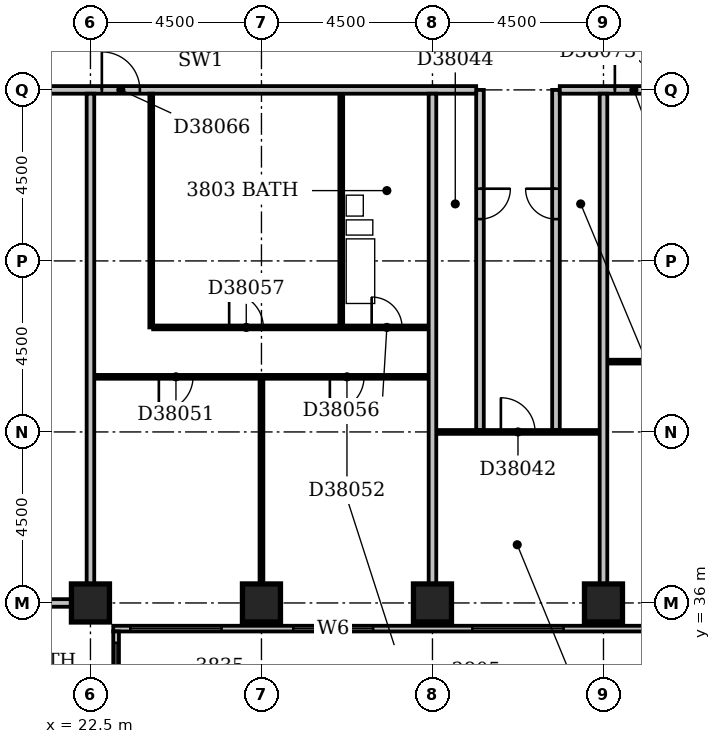
"""IFC4 building model, lengths in metres.
Left out: names, types, materials, properties, quantities, classifications, styles, units other than length and angle.
Written with IfcOpenShell. Run it as: python <this file> out.ifc"""

import sys

from ifc_helpers import new_model, si_unit, direction, frame, frame_2d, origin, origin_2d, place, context, subcontext, project, spatial, rectangle, extrude, element, fill, save


model = new_model("IFC4")
c1 = context("Model", 3, precision=1e-05, world=origin(), true_north=direction((0.0, 1.0)))
c2 = subcontext(c1, "Body", "Model", "MODEL_VIEW")
j1 = project(units=[si_unit("LENGTHUNIT", "METRE"), si_unit("PLANEANGLEUNIT", "RADIAN")], contexts=[c1])
p1 = place(None, origin())
s1 = spatial("IfcSite", under=j1, at=p1, CompositionType="ELEMENT")
p2 = place(p1, origin())
s2 = spatial("IfcBuilding", under=s1, at=p2, CompositionType="ELEMENT")
p3 = place(p2, frame((0.0, 0.0, 152.0)))
s3 = spatial("IfcBuildingStorey", under=s2, at=p3, CompositionType="ELEMENT", Elevation=152.0)
for number, where, z_axis, x_axis in (
    (1, (22.5, 36.0, -0.3), (0.0, 0.0, 1.0), (1.0, 0.0, 0.0)),
    (2, (27.0, 36.0, -0.3), (0.0, 0.0, 1.0), (1.0, 0.0, 0.0)),
    (3, (31.5, 36.0, -0.3), (0.0, 0.0, 1.0), (1.0, 0.0, 0.0)),
    (4, (36.0, 36.0, -0.3), (0.0, 0.0, 1.0), (1.0, 0.0, 0.0)),
):
    element("IfcColumn", number, at=place(p3, frame(where, z_axis=z_axis, x_axis=x_axis)), inside=s3, PredefinedType="COLUMN", context=c2, shape_type="SweptSolid", body=[
        extrude(rectangle(XDim=1.0, YDim=1.0, at=origin_2d()), origin(), (0.0, 0.0, 1.0), 3.6),
    ])
p4 = place(p3, frame((23.175, 17.4, 0.0), z_axis=(0.0, 0.0, 1.0), x_axis=(0.0, 1.0, 0.0)))
e5 = element("IfcWall", 5, at=p4, inside=s3, PredefinedType="STANDARD", context=c2, shape_type="SweptSolid", body=[
    extrude(rectangle(XDim=17.85, YDim=0.15, at=frame_2d((8.925, 0.0))), origin(), (0.0, 0.0, 1.0), 2.7),
])
p5 = place(p4, frame((1.65, 0.0, 0.6)))
e6 = element("IfcOpeningElement", 6, at=p5, cuts=e5, PredefinedType="OPENING", context=c2, shape_type="SweptSolid", body=[
    extrude(rectangle(XDim=2.4, YDim=1.8, at=frame_2d((1.2, 0.9))), frame((0.0, 0.087, 0.0), z_axis=(0.0, -1.0, 0.0), x_axis=(1.0, 0.0, 0.0)), (0.0, 0.0, 1.0), 0.174),
])
p6 = place(p4, frame((6.15, 0.0, 0.6)))
e7 = element("IfcOpeningElement", 7, at=p6, cuts=e5, PredefinedType="OPENING", context=c2, shape_type="SweptSolid", body=[
    extrude(rectangle(XDim=2.4, YDim=1.8, at=frame_2d((1.2, 0.9))), frame((0.0, 0.087, 0.0), z_axis=(0.0, -1.0, 0.0), x_axis=(1.0, 0.0, 0.0)), (0.0, 0.0, 1.0), 0.174),
])
p7 = place(p4, frame((11.844, 0.0, 0.6)))
e8 = element("IfcOpeningElement", 8, at=p7, cuts=e5, PredefinedType="OPENING", context=c2, shape_type="SweptSolid", body=[
    extrude(rectangle(XDim=1.5, YDim=1.8, at=frame_2d((0.75, 0.9))), frame((0.0, 0.087, 0.0), z_axis=(0.0, -1.0, 0.0), x_axis=(1.0, 0.0, 0.0)), (0.0, 0.0, 1.0), 0.174),
])
p8 = place(p4, frame((15.15, 0.0, 0.6)))
e9 = element("IfcOpeningElement", 9, at=p8, cuts=e5, PredefinedType="OPENING", context=c2, shape_type="SweptSolid", body=[
    extrude(rectangle(XDim=2.4, YDim=1.8, at=frame_2d((1.2, 0.9))), frame((0.0, 0.087, 0.0), z_axis=(0.0, -1.0, 0.0), x_axis=(1.0, 0.0, 0.0)), (0.0, 0.0, 1.0), 0.174),
])
p9 = place(p3, frame((23.1, 35.325, 0.0), z_axis=(0.0, 0.0, 1.0), x_axis=(1.0, 0.0, 0.0)))
e10 = element("IfcWall", 10, at=p9, inside=s3, PredefinedType="STANDARD", context=c2, shape_type="SweptSolid", body=[
    extrude(rectangle(XDim=45.15, YDim=0.15, at=frame_2d((22.575, 0.0))), origin(), (0.0, 0.0, 1.0), 2.7),
])
p10 = place(p9, frame((0.45, 0.0, 0.6)))
e11 = element("IfcOpeningElement", 11, at=p10, cuts=e10, PredefinedType="OPENING", context=c2, shape_type="SweptSolid", body=[
    extrude(rectangle(XDim=2.4, YDim=1.8, at=frame_2d((1.2, 0.9))), frame((0.0, 0.087, 0.0), z_axis=(0.0, -1.0, 0.0), x_axis=(1.0, 0.0, 0.0)), (0.0, 0.0, 1.0), 0.174),
])
p11 = place(p9, frame((4.738, 0.0, 0.6)))
e12 = element("IfcOpeningElement", 12, at=p11, cuts=e10, PredefinedType="OPENING", context=c2, shape_type="SweptSolid", body=[
    extrude(rectangle(XDim=2.1, YDim=1.8, at=frame_2d((1.05, 0.9))), frame((0.0, 0.087, 0.0), z_axis=(0.0, -1.0, 0.0), x_axis=(1.0, 0.0, 0.0)), (0.0, 0.0, 1.0), 0.174),
])
p12 = place(p9, frame((9.45, 0.0, 0.6)))
e13 = element("IfcOpeningElement", 13, at=p12, cuts=e10, PredefinedType="OPENING", context=c2, shape_type="SweptSolid", body=[
    extrude(rectangle(XDim=2.4, YDim=1.8, at=frame_2d((1.2, 0.9))), frame((0.0, 0.087, 0.0), z_axis=(0.0, -1.0, 0.0), x_axis=(1.0, 0.0, 0.0)), (0.0, 0.0, 1.0), 0.174),
])
p13 = place(p9, frame((13.95, 0.0, 0.6)))
e14 = element("IfcOpeningElement", 14, at=p13, cuts=e10, PredefinedType="OPENING", context=c2, shape_type="SweptSolid", body=[
    extrude(rectangle(XDim=2.4, YDim=1.8, at=frame_2d((1.2, 0.9))), frame((0.0, 0.087, 0.0), z_axis=(0.0, -1.0, 0.0), x_axis=(1.0, 0.0, 0.0)), (0.0, 0.0, 1.0), 0.174),
])
p14 = place(p9, frame((19.34, 0.0, 0.6)))
e15 = element("IfcOpeningElement", 15, at=p14, cuts=e10, PredefinedType="OPENING", context=c2, shape_type="SweptSolid", body=[
    extrude(rectangle(XDim=1.8, YDim=1.8, at=frame_2d((0.9, 0.9))), frame((0.0, 0.087, 0.0), z_axis=(0.0, -1.0, 0.0), x_axis=(1.0, 0.0, 0.0)), (0.0, 0.0, 1.0), 0.174),
])
p15 = place(p9, frame((22.95, 0.0, 0.6)))
e16 = element("IfcOpeningElement", 16, at=p15, cuts=e10, PredefinedType="OPENING", context=c2, shape_type="SweptSolid", body=[
    extrude(rectangle(XDim=2.4, YDim=1.8, at=frame_2d((1.2, 0.9))), frame((0.0, 0.087, 0.0), z_axis=(0.0, -1.0, 0.0), x_axis=(1.0, 0.0, 0.0)), (0.0, 0.0, 1.0), 0.174),
])
p16 = place(p9, frame((27.45, 0.0, 0.6)))
e17 = element("IfcOpeningElement", 17, at=p16, cuts=e10, PredefinedType="OPENING", context=c2, shape_type="SweptSolid", body=[
    extrude(rectangle(XDim=2.4, YDim=1.8, at=frame_2d((1.2, 0.9))), frame((0.0, 0.087, 0.0), z_axis=(0.0, -1.0, 0.0), x_axis=(1.0, 0.0, 0.0)), (0.0, 0.0, 1.0), 0.174),
])
p17 = place(p9, frame((31.95, 0.0, 0.6)))
e18 = element("IfcOpeningElement", 18, at=p17, cuts=e10, PredefinedType="OPENING", context=c2, shape_type="SweptSolid", body=[
    extrude(rectangle(XDim=2.4, YDim=1.8, at=frame_2d((1.2, 0.9))), frame((0.0, 0.087, 0.0), z_axis=(0.0, -1.0, 0.0), x_axis=(1.0, 0.0, 0.0)), (0.0, 0.0, 1.0), 0.174),
])
p18 = place(p9, frame((38.27, 0.0, 0.6)))
e19 = element("IfcOpeningElement", 19, at=p18, cuts=e10, PredefinedType="OPENING", context=c2, shape_type="SweptSolid", body=[
    extrude(rectangle(XDim=0.9, YDim=1.8, at=frame_2d((0.45, 0.9))), frame((0.0, 0.087, 0.0), z_axis=(0.0, -1.0, 0.0), x_axis=(1.0, 0.0, 0.0)), (0.0, 0.0, 1.0), 0.174),
])
p19 = place(p9, frame((40.95, 0.0, 0.6)))
e20 = element("IfcOpeningElement", 20, at=p19, cuts=e10, PredefinedType="OPENING", context=c2, shape_type="SweptSolid", body=[
    extrude(rectangle(XDim=2.4, YDim=1.8, at=frame_2d((1.2, 0.9))), frame((0.0, 0.087, 0.0), z_axis=(0.0, -1.0, 0.0), x_axis=(1.0, 0.0, 0.0)), (0.0, 0.0, 1.0), 0.174),
])
for number, where, z_axis, x_axis in (
    (21, (9.1, 36.0, 0.0), (0.0, 0.0, 1.0), (1.0, 0.0, 0.0)),
    (22, (22.5, 36.5, 0.0), (0.0, 0.0, 1.0), (0.0, 1.0, 0.0)),
):
    element("IfcWall", number, at=place(p3, frame(where, z_axis=z_axis, x_axis=x_axis)), inside=s3, PredefinedType="PARTITIONING", context=c2, shape_type="SweptSolid", body=[
        extrude(rectangle(XDim=12.9, YDim=0.2, at=frame_2d((6.45, 0.0))), origin(), (0.0, 0.0, 1.0), 3.3),
    ])
p20 = place(p3, frame((27.0, 36.5, 0.0), z_axis=(0.0, 0.0, 1.0), x_axis=(0.0, 1.0, 0.0)))
e23 = element("IfcWall", 23, at=p20, inside=s3, PredefinedType="PARTITIONING", context=c2, shape_type="SweptSolid", body=[
    extrude(rectangle(XDim=5.4, YDim=0.1, at=frame_2d((2.7, 0.0))), origin(), (0.0, 0.0, 1.0), 2.6),
])
p21 = place(p3, frame((31.5, 36.5, 0.0), z_axis=(0.0, 0.0, 1.0), x_axis=(0.0, 1.0, 0.0)))
e24 = element("IfcWall", 24, at=p21, inside=s3, PredefinedType="PARTITIONING", context=c2, shape_type="SweptSolid", body=[
    extrude(rectangle(XDim=12.9, YDim=0.2, at=frame_2d((6.45, 0.0))), origin(), (0.0, 0.0, 1.0), 3.3),
])
p22 = place(p3, frame((36.0, 36.5, 0.0), z_axis=(0.0, 0.0, 1.0), x_axis=(0.0, 1.0, 0.0)))
e25 = element("IfcWall", 25, at=p22, inside=s3, PredefinedType="PARTITIONING", context=c2, shape_type="SweptSolid", body=[
    extrude(rectangle(XDim=12.9, YDim=0.2, at=frame_2d((6.45, 0.0))), origin(), (0.0, 0.0, 1.0), 2.4),
])
p23 = place(p3, frame((31.6, 40.5, 0.0), z_axis=(0.0, 0.0, 1.0), x_axis=(1.0, 0.0, 0.0)))
e26 = element("IfcWall", 26, at=p23, inside=s3, PredefinedType="PARTITIONING", context=c2, shape_type="SweptSolid", body=[
    extrude(rectangle(XDim=4.3, YDim=0.1, at=frame_2d((2.15, 0.0))), origin(), (0.0, 0.0, 1.0), 3.3),
])
p24 = place(p23, frame((1.7, 0.0, 0.0)))
e27 = element("IfcOpeningElement", 27, at=p24, cuts=e26, PredefinedType="OPENING", context=c2, shape_type="SweptSolid", body=[
    extrude(rectangle(XDim=0.9, YDim=2.1, at=frame_2d((0.45, 1.05))), frame((0.0, 0.062, 0.0), z_axis=(0.0, -1.0, 0.0), x_axis=(1.0, 0.0, 0.0)), (0.0, 0.0, 1.0), 0.124),
])
p25 = place(p3, frame((32.75, 40.55, 0.0), z_axis=(0.0, 0.0, 1.0), x_axis=(0.0, 1.0, 0.0)))
e28 = element("IfcWall", 28, at=p25, inside=s3, PredefinedType="PARTITIONING", context=c2, shape_type="SweptSolid", body=[
    extrude(rectangle(XDim=8.95, YDim=0.2, at=frame_2d((4.475, 0.0))), origin(), (0.0, 0.0, 1.0), 3.3),
])
p26 = place(p25, frame((5.55, 0.0, 0.0)))
e29 = element("IfcOpeningElement", 29, at=p26, cuts=e28, PredefinedType="OPENING", context=c2, shape_type="SweptSolid", body=[
    extrude(rectangle(XDim=0.8, YDim=2.1, at=frame_2d((0.4, 1.05))), frame((0.0, 0.112, 0.0), z_axis=(0.0, -1.0, 0.0), x_axis=(1.0, 0.0, 0.0)), (0.0, 0.0, 1.0), 0.224),
])
p27 = place(p3, frame((34.75, 40.55, 0.0), z_axis=(0.0, 0.0, 1.0), x_axis=(0.0, 1.0, 0.0)))
e30 = element("IfcWall", 30, at=p27, inside=s3, PredefinedType="PARTITIONING", context=c2, shape_type="SweptSolid", body=[
    extrude(rectangle(XDim=8.95, YDim=0.2, at=frame_2d((4.475, 0.0))), origin(), (0.0, 0.0, 1.0), 3.3),
])
p28 = place(p27, frame((5.55, 0.0, 0.0)))
e31 = element("IfcOpeningElement", 31, at=p28, cuts=e30, PredefinedType="OPENING", context=c2, shape_type="SweptSolid", body=[
    extrude(rectangle(XDim=0.8, YDim=2.1, at=frame_2d((0.4, 1.05))), frame((0.0, 0.112, 0.0), z_axis=(0.0, -1.0, 0.0), x_axis=(1.0, 0.0, 0.0)), (0.0, 0.0, 1.0), 0.224),
])
p29 = place(p3, frame((22.6, 41.95, 0.0), z_axis=(0.0, 0.0, 1.0), x_axis=(1.0, 0.0, 0.0)))
e32 = element("IfcWall", 32, at=p29, inside=s3, PredefinedType="PARTITIONING", context=c2, shape_type="SweptSolid", body=[
    extrude(rectangle(XDim=8.8, YDim=0.1, at=frame_2d((4.4, 0.0))), origin(), (0.0, 0.0, 1.0), 3.3),
])
p30 = place(p29, frame((1.7, 0.0, 0.0)))
e33 = element("IfcOpeningElement", 33, at=p30, cuts=e32, PredefinedType="OPENING", context=c2, shape_type="SweptSolid", body=[
    extrude(rectangle(XDim=0.9, YDim=2.1, at=frame_2d((0.45, 1.05))), frame((0.0, 0.062, 0.0), z_axis=(0.0, -1.0, 0.0), x_axis=(1.0, 0.0, 0.0)), (0.0, 0.0, 1.0), 0.124),
])
p31 = place(p29, frame((6.2, 0.0, 0.0)))
e34 = element("IfcOpeningElement", 34, at=p31, cuts=e32, PredefinedType="OPENING", context=c2, shape_type="SweptSolid", body=[
    extrude(rectangle(XDim=0.9, YDim=2.1, at=frame_2d((0.45, 1.05))), frame((0.0, 0.062, 0.0), z_axis=(0.0, -1.0, 0.0), x_axis=(1.0, 0.0, 0.0)), (0.0, 0.0, 1.0), 0.124),
])
p32 = place(p3, frame((36.1, 42.35, 0.0), z_axis=(0.0, 0.0, 1.0), x_axis=(1.0, 0.0, 0.0)))
e35 = element("IfcWall", 35, at=p32, inside=s3, PredefinedType="PARTITIONING", context=c2, shape_type="SweptSolid", body=[
    extrude(rectangle(XDim=13.3, YDim=0.1, at=frame_2d((6.65, 0.0))), origin(), (0.0, 0.0, 1.0), 3.3),
])
p33 = place(p32, frame((1.7, 0.0, 0.0)))
e36 = element("IfcOpeningElement", 36, at=p33, cuts=e35, PredefinedType="OPENING", context=c2, shape_type="SweptSolid", body=[
    extrude(rectangle(XDim=0.9, YDim=2.1, at=frame_2d((0.45, 1.05))), frame((0.0, 0.062, 0.0), z_axis=(0.0, -1.0, 0.0), x_axis=(1.0, 0.0, 0.0)), (0.0, 0.0, 1.0), 0.124),
])
p34 = place(p32, frame((6.2, 0.0, 0.0)))
e37 = element("IfcOpeningElement", 37, at=p34, cuts=e35, PredefinedType="OPENING", context=c2, shape_type="SweptSolid", body=[
    extrude(rectangle(XDim=0.9, YDim=2.1, at=frame_2d((0.45, 1.05))), frame((0.0, 0.062, 0.0), z_axis=(0.0, -1.0, 0.0), x_axis=(1.0, 0.0, 0.0)), (0.0, 0.0, 1.0), 0.124),
])
p35 = place(p32, frame((10.7, 0.0, 0.0)))
e38 = element("IfcOpeningElement", 38, at=p35, cuts=e35, PredefinedType="OPENING", context=c2, shape_type="SweptSolid", body=[
    extrude(rectangle(XDim=0.9, YDim=2.1, at=frame_2d((0.45, 1.05))), frame((0.0, 0.062, 0.0), z_axis=(0.0, -1.0, 0.0), x_axis=(1.0, 0.0, 0.0)), (0.0, 0.0, 1.0), 0.124),
])
p36 = place(p3, frame((24.1, 43.25, 0.0), z_axis=(0.0, 0.0, 1.0), x_axis=(0.0, 1.0, 0.0)))
e39 = element("IfcWall", 39, at=p36, inside=s3, PredefinedType="PARTITIONING", context=c2, shape_type="SweptSolid", body=[
    extrude(rectangle(XDim=6.15, YDim=0.1, at=frame_2d((3.075, 0.0))), origin(), (0.0, 0.0, 1.0), 3.3),
])
p37 = place(p3, frame((24.15, 43.25, 0.0), z_axis=(0.0, 0.0, 1.0), x_axis=(1.0, 0.0, 0.0)))
e40 = element("IfcWall", 40, at=p37, inside=s3, PredefinedType="PARTITIONING", context=c2, shape_type="SweptSolid", body=[
    extrude(rectangle(XDim=7.25, YDim=0.1, at=frame_2d((3.625, 0.0))), origin(), (0.0, 0.0, 1.0), 3.3),
])
p38 = place(p37, frame((5.75, 0.0, 0.0)))
e41 = element("IfcOpeningElement", 41, at=p38, cuts=e40, PredefinedType="OPENING", context=c2, shape_type="SweptSolid", body=[
    extrude(rectangle(XDim=0.8, YDim=2.1, at=frame_2d((0.4, 1.05))), frame((0.0, 0.062, 0.0), z_axis=(0.0, -1.0, 0.0), x_axis=(1.0, 0.0, 0.0)), (0.0, 0.0, 1.0), 0.124),
])
p39 = place(p37, frame((2.0, 0.0, 0.0)))
e42 = element("IfcOpeningElement", 42, at=p39, cuts=e40, PredefinedType="OPENING", context=c2, shape_type="SweptSolid", body=[
    extrude(rectangle(XDim=0.9, YDim=2.1, at=frame_2d((0.45, 1.05))), frame((0.0, 0.062, 0.0), z_axis=(0.0, -1.0, 0.0), x_axis=(1.0, 0.0, 0.0)), (0.0, 0.0, 1.0), 0.124),
])
p40 = place(p3, frame((29.1, 43.3, 0.0), z_axis=(0.0, 0.0, 1.0), x_axis=(0.0, 1.0, 0.0)))
e43 = element("IfcWall", 43, at=p40, inside=s3, PredefinedType="PLUMBINGWALL", context=c2, shape_type="SweptSolid", body=[
    extrude(rectangle(XDim=6.1, YDim=0.1, at=frame_2d((3.05, 0.0))), origin(), (0.0, 0.0, 1.0), 3.3),
])
p41 = place(p3, frame((9.1, 49.5, 0.0), z_axis=(0.0, 0.0, 1.0), x_axis=(1.0, 0.0, 0.0)))
e44 = element("IfcWall", 44, at=p41, inside=s3, PredefinedType="PARTITIONING", context=c2, shape_type="SweptSolid", body=[
    extrude(rectangle(XDim=23.55, YDim=0.2, at=frame_2d((11.775, 0.0))), origin(), (0.0, 0.0, 1.0), 3.3),
])
p42 = place(p41, frame((13.7, 0.0, 0.0)))
e45 = element("IfcOpeningElement", 45, at=p42, cuts=e44, PredefinedType="OPENING", context=c2, shape_type="SweptSolid", body=[
    extrude(rectangle(XDim=1.0, YDim=2.1, at=frame_2d((0.5, 1.05))), frame((0.0, 0.112, 0.0), z_axis=(0.0, -1.0, 0.0), x_axis=(1.0, 0.0, 0.0)), (0.0, 0.0, 1.0), 0.224),
])
p43 = place(p41, frame((10.65, 0.0, 0.0)))
e46 = element("IfcOpeningElement", 46, at=p43, cuts=e44, PredefinedType="OPENING", context=c2, shape_type="SweptSolid", body=[
    extrude(rectangle(XDim=0.9, YDim=2.1, at=frame_2d((0.45, 1.05))), frame((0.0, 0.112, 0.0), z_axis=(0.0, -1.0, 0.0), x_axis=(1.0, 0.0, 0.0)), (0.0, 0.0, 1.0), 0.224),
])
p44 = place(p3, frame((34.85, 49.5, 0.0), z_axis=(0.0, 0.0, 1.0), x_axis=(1.0, 0.0, 0.0)))
e47 = element("IfcWall", 47, at=p44, inside=s3, PredefinedType="PARTITIONING", context=c2, shape_type="SweptSolid", body=[
    extrude(rectangle(XDim=15.8, YDim=0.2, at=frame_2d((7.9, 0.0))), origin(), (0.0, 0.0, 1.0), 3.3),
])
p45 = place(p44, frame((1.45, 0.0, 0.0)))
e48 = element("IfcOpeningElement", 48, at=p45, cuts=e47, PredefinedType="OPENING", context=c2, shape_type="SweptSolid", body=[
    extrude(rectangle(XDim=1.0, YDim=2.1, at=frame_2d((0.5, 1.05))), frame((0.0, 0.112, 0.0), z_axis=(0.0, -1.0, 0.0), x_axis=(1.0, 0.0, 0.0)), (0.0, 0.0, 1.0), 0.224),
])
p46 = place(p8, origin())
e49 = element("IfcWindow", 49, at=p46, inside=s3, PartitioningType="SINGLE_PANEL", PredefinedType="WINDOW", context=c2, shape_type="SweptSolid", body=[
    extrude(rectangle(XDim=2.4, YDim=1.8, at=frame_2d((1.2, 0.9))), frame((0.0, 0.03, 0.0), z_axis=(0.0, -1.0, 0.0), x_axis=(1.0, 0.0, 0.0)), (0.0, 0.0, 1.0), 0.06),
])
fill(e9, e49)
p47 = place(p10, origin())
e50 = element("IfcWindow", 50, at=p47, inside=s3, PartitioningType="SINGLE_PANEL", PredefinedType="WINDOW", context=c2, shape_type="SweptSolid", body=[
    extrude(rectangle(XDim=2.4, YDim=1.8, at=frame_2d((1.2, 0.9))), frame((0.0, 0.03, 0.0), z_axis=(0.0, -1.0, 0.0), x_axis=(1.0, 0.0, 0.0)), (0.0, 0.0, 1.0), 0.06),
])
fill(e11, e50)
p48 = place(p11, origin())
e51 = element("IfcWindow", 51, at=p48, inside=s3, PartitioningType="SINGLE_PANEL", PredefinedType="WINDOW", context=c2, shape_type="SweptSolid", body=[
    extrude(rectangle(XDim=2.1, YDim=1.8, at=frame_2d((1.05, 0.9))), frame((0.0, 0.03, 0.0), z_axis=(0.0, -1.0, 0.0), x_axis=(1.0, 0.0, 0.0)), (0.0, 0.0, 1.0), 0.06),
])
fill(e12, e51)
p49 = place(p12, origin())
e52 = element("IfcWindow", 52, at=p49, inside=s3, PartitioningType="SINGLE_PANEL", PredefinedType="WINDOW", context=c2, shape_type="SweptSolid", body=[
    extrude(rectangle(XDim=2.4, YDim=1.8, at=frame_2d((1.2, 0.9))), frame((0.0, 0.03, 0.0), z_axis=(0.0, -1.0, 0.0), x_axis=(1.0, 0.0, 0.0)), (0.0, 0.0, 1.0), 0.06),
])
fill(e13, e52)
p50 = place(p24, origin())
e53 = element("IfcDoor", 53, at=p50, inside=s3, OperationType="SINGLE_SWING_LEFT", PredefinedType="DOOR", context=c2, shape_type="SweptSolid", body=[
    extrude(rectangle(XDim=0.9, YDim=2.1, at=frame_2d((0.45, 1.05))), frame((0.0, 0.025, 0.0), z_axis=(0.0, -1.0, 0.0), x_axis=(1.0, 0.0, 0.0)), (0.0, 0.0, 1.0), 0.05),
])
fill(e27, e53)
p51 = place(p26, origin())
e54 = element("IfcDoor", 54, at=p51, inside=s3, OperationType="SINGLE_SWING_RIGHT", PredefinedType="DOOR", context=c2, shape_type="SweptSolid", body=[
    extrude(rectangle(XDim=0.8, YDim=2.1, at=frame_2d((0.4, 1.05))), frame((0.0, 0.025, 0.0), z_axis=(0.0, -1.0, 0.0), x_axis=(1.0, 0.0, 0.0)), (0.0, 0.0, 1.0), 0.05),
])
fill(e29, e54)
p52 = place(p28, frame((0.8, 0.0, 0.0), z_axis=(0.0, 0.0, 1.0), x_axis=(-1.0, 0.0, 0.0)))
e55 = element("IfcDoor", 55, at=p52, inside=s3, OperationType="SINGLE_SWING_LEFT", PredefinedType="DOOR", context=c2, shape_type="SweptSolid", body=[
    extrude(rectangle(XDim=0.8, YDim=2.1, at=frame_2d((0.4, 1.05))), frame((0.0, 0.025, 0.0), z_axis=(0.0, -1.0, 0.0), x_axis=(1.0, 0.0, 0.0)), (0.0, 0.0, 1.0), 0.05),
])
fill(e31, e55)
p53 = place(p30, frame((0.9, 0.0, 0.0), z_axis=(0.0, 0.0, 1.0), x_axis=(-1.0, 0.0, 0.0)))
e56 = element("IfcDoor", 56, at=p53, inside=s3, OperationType="SINGLE_SWING_RIGHT", PredefinedType="DOOR", context=c2, shape_type="SweptSolid", body=[
    extrude(rectangle(XDim=0.9, YDim=2.1, at=frame_2d((0.45, 1.05))), frame((0.0, 0.025, 0.0), z_axis=(0.0, -1.0, 0.0), x_axis=(1.0, 0.0, 0.0)), (0.0, 0.0, 1.0), 0.05),
])
fill(e33, e56)
p54 = place(p31, frame((0.9, 0.0, 0.0), z_axis=(0.0, 0.0, 1.0), x_axis=(-1.0, 0.0, 0.0)))
e57 = element("IfcDoor", 57, at=p54, inside=s3, OperationType="SINGLE_SWING_RIGHT", PredefinedType="DOOR", context=c2, shape_type="SweptSolid", body=[
    extrude(rectangle(XDim=0.9, YDim=2.1, at=frame_2d((0.45, 1.05))), frame((0.0, 0.025, 0.0), z_axis=(0.0, -1.0, 0.0), x_axis=(1.0, 0.0, 0.0)), (0.0, 0.0, 1.0), 0.05),
])
fill(e34, e57)
p55 = place(p38, origin())
e58 = element("IfcDoor", 58, at=p55, inside=s3, OperationType="SINGLE_SWING_LEFT", PredefinedType="DOOR", context=c2, shape_type="SweptSolid", body=[
    extrude(rectangle(XDim=0.8, YDim=2.1, at=frame_2d((0.4, 1.05))), frame((0.0, 0.025, 0.0), z_axis=(0.0, -1.0, 0.0), x_axis=(1.0, 0.0, 0.0)), (0.0, 0.0, 1.0), 0.05),
])
fill(e41, e58)
p56 = place(p39, origin())
e59 = element("IfcDoor", 59, at=p56, inside=s3, OperationType="SINGLE_SWING_LEFT", PredefinedType="DOOR", context=c2, shape_type="SweptSolid", body=[
    extrude(rectangle(XDim=0.9, YDim=2.1, at=frame_2d((0.45, 1.05))), frame((0.0, 0.025, 0.0), z_axis=(0.0, -1.0, 0.0), x_axis=(1.0, 0.0, 0.0)), (0.0, 0.0, 1.0), 0.05),
])
fill(e42, e59)
p57 = place(p42, origin())
e60 = element("IfcDoor", 60, at=p57, inside=s3, OperationType="SINGLE_SWING_LEFT", PredefinedType="DOOR", context=c2, shape_type="SweptSolid", body=[
    extrude(rectangle(XDim=1.0, YDim=2.1, at=frame_2d((0.5, 1.05))), frame((0.0, 0.025, 0.0), z_axis=(0.0, -1.0, 0.0), x_axis=(1.0, 0.0, 0.0)), (0.0, 0.0, 1.0), 0.05),
])
fill(e45, e60)
p58 = place(p45, origin())
e61 = element("IfcDoor", 61, at=p58, inside=s3, OperationType="SINGLE_SWING_LEFT", PredefinedType="DOOR", context=c2, shape_type="SweptSolid", body=[
    extrude(rectangle(XDim=1.0, YDim=2.1, at=frame_2d((0.5, 1.05))), frame((0.0, 0.025, 0.0), z_axis=(0.0, -1.0, 0.0), x_axis=(1.0, 0.0, 0.0)), (0.0, 0.0, 1.0), 0.05),
])
fill(e48, e61)
save(model, sys.argv[1])
